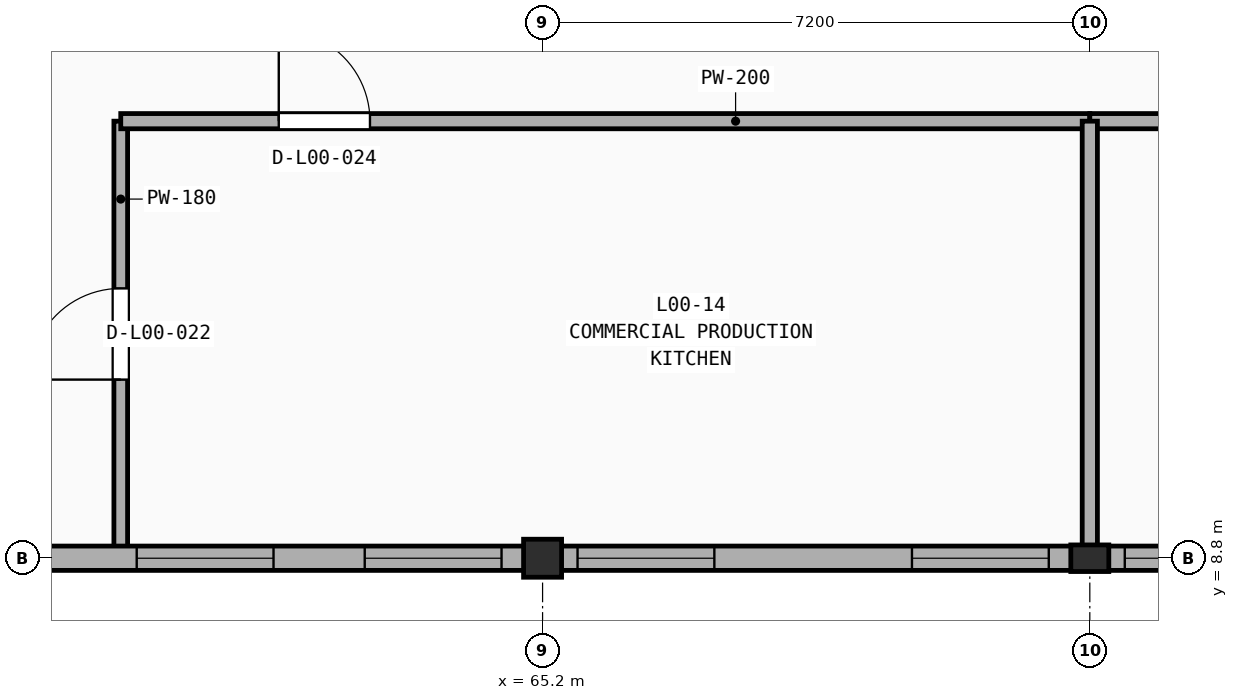
"""IFC4 building model, lengths in metres.
Left out: names, types, materials, properties, quantities, classifications, styles, units other than length and angle.
Written with IfcOpenShell. Run it as: python <this file> out.ifc"""

import sys

from ifc_helpers import new_model, si_unit, direction, frame, frame_2d, origin, origin_2d, place, context, subcontext, project, spatial, rectangle, extrude, element, fill, save


model = new_model("IFC4")
c1 = context("Model", 3, precision=1e-05, world=origin(), true_north=direction((0.0, 1.0)))
c2 = subcontext(c1, "Body", "Model", "MODEL_VIEW")
j1 = project(units=[si_unit("LENGTHUNIT", "METRE"), si_unit("PLANEANGLEUNIT", "RADIAN")], contexts=[c1])
p1 = place(None, origin())
s1 = spatial("IfcSite", under=j1, at=p1, CompositionType="ELEMENT")
p2 = place(p1, origin())
s2 = spatial("IfcBuilding", under=s1, at=p2, CompositionType="ELEMENT")
p3 = place(p2, origin())
s3 = spatial("IfcBuildingStorey", under=s2, at=p3, CompositionType="ELEMENT", Elevation=0.0)
p4 = place(p3, frame((65.2, 8.8, 0.0), z_axis=(0.0, 0.0, 1.0), x_axis=(1.0, 0.0, 0.0)))
e1 = element("IfcColumn", 1, at=p4, inside=s3, PredefinedType="COLUMN", context=c2, shape_type="SweptSolid", body=[
    extrude(rectangle(XDim=0.5, YDim=0.5, at=origin_2d()), origin(), (0.0, 0.0, 1.0), 5.4),
])
p5 = place(p3, frame((72.4, 8.8, 0.0), z_axis=(0.0, 0.0, 1.0), x_axis=(1.0, 0.0, 0.0)))
e2 = element("IfcColumn", 2, at=p5, inside=s3, PredefinedType="PILASTER", context=c2, shape_type="SweptSolid", body=[
    extrude(rectangle(XDim=0.5, YDim=0.35, at=origin_2d()), origin(), (0.0, 0.0, 1.0), 5.4),
])
p6 = place(p3, frame((59.65, 8.95, 0.0), z_axis=(0.0, 0.0, 1.0), x_axis=(0.0, 1.0, 0.0)))
e3 = element("IfcWall", 3, at=p6, inside=s3, PredefinedType="PARTITIONING", context=c2, shape_type="SweptSolid", body=[
    extrude(rectangle(XDim=5.6, YDim=0.18, at=frame_2d((2.8, 0.0))), origin(), (0.0, 0.0, 1.0), 4.64),
])
p7 = place(p6, frame((2.2, 0.0, -0.01)))
e4 = element("IfcOpeningElement", 4, at=p7, cuts=e3, PredefinedType="OPENING", context=c2, shape_type="SweptSolid", body=[
    extrude(rectangle(XDim=1.2, YDim=2.21, at=frame_2d((0.6, 1.105))), frame((0.0, 0.1, 0.0), z_axis=(0.0, -1.0, 0.0), x_axis=(1.0, 0.0, 0.0)), (0.0, 0.0, 1.0), 0.2),
])
p8 = place(p3, frame((59.65, 14.55, 0.0), z_axis=(0.0, 0.0, 1.0), x_axis=(1.0, 0.0, 0.0)))
e5 = element("IfcWall", 5, at=p8, inside=s3, PredefinedType="PARTITIONING", context=c2, shape_type="SweptSolid", body=[
    extrude(rectangle(XDim=12.75, YDim=0.2, at=frame_2d((6.375, 0.0))), origin(), (0.0, 0.0, 1.0), 4.39),
])
p9 = place(p8, frame((2.079, 0.0, -0.01)))
e6 = element("IfcOpeningElement", 6, at=p9, cuts=e5, PredefinedType="OPENING", context=c2, shape_type="SweptSolid", body=[
    extrude(rectangle(XDim=1.2, YDim=2.21, at=frame_2d((0.6, 1.105))), frame((0.0, 0.11, 0.0), z_axis=(0.0, -1.0, 0.0), x_axis=(1.0, 0.0, 0.0)), (0.0, 0.0, 1.0), 0.22),
])
p10 = place(p3, frame((72.4, 14.55, 0.0), z_axis=(0.0, 0.0, 1.0), x_axis=(1.0, 0.0, 0.0)))
e7 = element("IfcWall", 7, at=p10, inside=s3, PredefinedType="PARTITIONING", context=c2, shape_type="SweptSolid", body=[
    extrude(rectangle(XDim=14.55, YDim=0.2, at=frame_2d((7.275, 0.0))), origin(), (0.0, 0.0, 1.0), 4.39),
])
p11 = place(p10, frame((5.34, 0.0, -0.01)))
e8 = element("IfcOpeningElement", 8, at=p11, cuts=e7, PredefinedType="OPENING", context=c2, shape_type="SweptSolid", body=[
    extrude(rectangle(XDim=1.2, YDim=2.21, at=frame_2d((0.6, 1.105))), frame((0.0, 0.11, 0.0), z_axis=(0.0, -1.0, 0.0), x_axis=(1.0, 0.0, 0.0)), (0.0, 0.0, 1.0), 0.22),
])
p12 = place(p3, frame((72.4, 8.95, 0.0), z_axis=(0.0, 0.0, 1.0), x_axis=(0.0, 1.0, 0.0)))
e9 = element("IfcWall", 9, at=p12, inside=s3, PredefinedType="PARTITIONING", context=c2, shape_type="SweptSolid", body=[
    extrude(rectangle(XDim=5.6, YDim=0.2, at=frame_2d((2.8, 0.0))), origin(), (0.0, 0.0, 1.0), 4.39),
])
p13 = place(p3, frame((58.0, 8.8, 0.0), z_axis=(0.0, 0.0, 1.0), x_axis=(1.0, 0.0, 0.0)))
e10 = element("IfcWall", 10, at=p13, inside=s3, PredefinedType="SOLIDWALL", context=c2, shape_type="SweptSolid", body=[
    extrude(rectangle(XDim=7.2, YDim=0.32, at=frame_2d((3.6, 0.0))), origin(), (0.0, 0.0, 1.0), 4.39),
])
p14 = place(p13, frame((1.86, 0.0, 0.9)))
e11 = element("IfcOpeningElement", 11, at=p14, cuts=e10, PredefinedType="OPENING", context=c2, shape_type="SweptSolid", body=[
    extrude(rectangle(XDim=1.8, YDim=2.2, at=frame_2d((0.9, 1.1))), frame((0.0, 0.17, 0.0), z_axis=(0.0, -1.0, 0.0), x_axis=(1.0, 0.0, 0.0)), (0.0, 0.0, 1.0), 0.34),
])
p15 = place(p13, frame((4.86, 0.0, 0.9)))
e12 = element("IfcOpeningElement", 12, at=p15, cuts=e10, PredefinedType="OPENING", context=c2, shape_type="SweptSolid", body=[
    extrude(rectangle(XDim=1.8, YDim=2.2, at=frame_2d((0.9, 1.1))), frame((0.0, 0.17, 0.0), z_axis=(0.0, -1.0, 0.0), x_axis=(1.0, 0.0, 0.0)), (0.0, 0.0, 1.0), 0.34),
])
p16 = place(p3, frame((65.2, 8.8, 0.0), z_axis=(0.0, 0.0, 1.0), x_axis=(1.0, 0.0, 0.0)))
e13 = element("IfcWall", 13, at=p16, inside=s3, PredefinedType="SOLIDWALL", context=c2, shape_type="SweptSolid", body=[
    extrude(rectangle(XDim=7.2, YDim=0.32, at=frame_2d((3.6, 0.0))), origin(), (0.0, 0.0, 1.0), 4.39),
])
p17 = place(p16, frame((0.46, 0.0, 0.9)))
e14 = element("IfcOpeningElement", 14, at=p17, cuts=e13, PredefinedType="OPENING", context=c2, shape_type="SweptSolid", body=[
    extrude(rectangle(XDim=1.8, YDim=2.2, at=frame_2d((0.9, 1.1))), frame((0.0, 0.17, 0.0), z_axis=(0.0, -1.0, 0.0), x_axis=(1.0, 0.0, 0.0)), (0.0, 0.0, 1.0), 0.34),
])
p18 = place(p16, frame((4.86, 0.0, 0.9)))
e15 = element("IfcOpeningElement", 15, at=p18, cuts=e13, PredefinedType="OPENING", context=c2, shape_type="SweptSolid", body=[
    extrude(rectangle(XDim=1.8, YDim=2.2, at=frame_2d((0.9, 1.1))), frame((0.0, 0.17, 0.0), z_axis=(0.0, -1.0, 0.0), x_axis=(1.0, 0.0, 0.0)), (0.0, 0.0, 1.0), 0.34),
])
p19 = place(p3, frame((72.4, 8.8, 0.0), z_axis=(0.0, 0.0, 1.0), x_axis=(1.0, 0.0, 0.0)))
e16 = element("IfcWall", 16, at=p19, inside=s3, PredefinedType="SOLIDWALL", context=c2, shape_type="SweptSolid", body=[
    extrude(rectangle(XDim=7.2, YDim=0.32, at=frame_2d((3.6, 0.0))), origin(), (0.0, 0.0, 1.0), 4.39),
])
p20 = place(p19, frame((0.46, 0.0, 0.9)))
e17 = element("IfcOpeningElement", 17, at=p20, cuts=e16, PredefinedType="OPENING", context=c2, shape_type="SweptSolid", body=[
    extrude(rectangle(XDim=1.8, YDim=2.2, at=frame_2d((0.9, 1.1))), frame((0.0, 0.17, 0.0), z_axis=(0.0, -1.0, 0.0), x_axis=(1.0, 0.0, 0.0)), (0.0, 0.0, 1.0), 0.34),
])
p21 = place(p19, frame((4.86, 0.0, 0.9)))
e18 = element("IfcOpeningElement", 18, at=p21, cuts=e16, PredefinedType="OPENING", context=c2, shape_type="SweptSolid", body=[
    extrude(rectangle(XDim=1.8, YDim=2.2, at=frame_2d((0.9, 1.1))), frame((0.0, 0.17, 0.0), z_axis=(0.0, -1.0, 0.0), x_axis=(1.0, 0.0, 0.0)), (0.0, 0.0, 1.0), 0.34),
])
p22 = place(p7, frame((0.0, 0.0, 0.01)))
e19 = element("IfcDoor", 19, at=p22, inside=s3, OperationType="SINGLE_SWING_LEFT", PredefinedType="DOOR", context=c2, shape_type="SweptSolid", body=[
    extrude(rectangle(XDim=1.2, YDim=2.2, at=frame_2d((0.6, 1.1))), frame((0.0, 0.025, 0.0), z_axis=(0.0, -1.0, 0.0), x_axis=(1.0, 0.0, 0.0)), (0.0, 0.0, 1.0), 0.05),
])
fill(e4, e19)
p23 = place(p9, frame((1.2, 0.0, 0.01), z_axis=(0.0, 0.0, 1.0), x_axis=(-1.0, 0.0, 0.0)))
e20 = element("IfcDoor", 20, at=p23, inside=s3, OperationType="SINGLE_SWING_LEFT", PredefinedType="DOOR", context=c2, shape_type="SweptSolid", body=[
    extrude(rectangle(XDim=1.2, YDim=2.2, at=frame_2d((0.6, 1.1))), frame((0.0, 0.025, 0.0), z_axis=(0.0, -1.0, 0.0), x_axis=(1.0, 0.0, 0.0)), (0.0, 0.0, 1.0), 0.05),
])
fill(e6, e20)
p24 = place(p14, origin())
e21 = element("IfcWindow", 21, at=p24, inside=s3, PartitioningType="DOUBLE_PANEL_VERTICAL", PredefinedType="WINDOW", context=c2, shape_type="SweptSolid", body=[
    extrude(rectangle(XDim=1.8, YDim=2.2, at=frame_2d((0.9, 1.1))), frame((0.0, 0.03, 0.0), z_axis=(0.0, -1.0, 0.0), x_axis=(1.0, 0.0, 0.0)), (0.0, 0.0, 1.0), 0.06),
])
fill(e11, e21)
p25 = place(p15, origin())
e22 = element("IfcWindow", 22, at=p25, inside=s3, PartitioningType="DOUBLE_PANEL_VERTICAL", PredefinedType="WINDOW", context=c2, shape_type="SweptSolid", body=[
    extrude(rectangle(XDim=1.8, YDim=2.2, at=frame_2d((0.9, 1.1))), frame((0.0, 0.03, 0.0), z_axis=(0.0, -1.0, 0.0), x_axis=(1.0, 0.0, 0.0)), (0.0, 0.0, 1.0), 0.06),
])
fill(e12, e22)
p26 = place(p17, origin())
e23 = element("IfcWindow", 23, at=p26, inside=s3, PartitioningType="DOUBLE_PANEL_VERTICAL", PredefinedType="WINDOW", context=c2, shape_type="SweptSolid", body=[
    extrude(rectangle(XDim=1.8, YDim=2.2, at=frame_2d((0.9, 1.1))), frame((0.0, 0.03, 0.0), z_axis=(0.0, -1.0, 0.0), x_axis=(1.0, 0.0, 0.0)), (0.0, 0.0, 1.0), 0.06),
])
fill(e14, e23)
p27 = place(p18, origin())
e24 = element("IfcWindow", 24, at=p27, inside=s3, PartitioningType="DOUBLE_PANEL_VERTICAL", PredefinedType="WINDOW", context=c2, shape_type="SweptSolid", body=[
    extrude(rectangle(XDim=1.8, YDim=2.2, at=frame_2d((0.9, 1.1))), frame((0.0, 0.03, 0.0), z_axis=(0.0, -1.0, 0.0), x_axis=(1.0, 0.0, 0.0)), (0.0, 0.0, 1.0), 0.06),
])
fill(e15, e24)
p28 = place(p20, origin())
e25 = element("IfcWindow", 25, at=p28, inside=s3, PartitioningType="DOUBLE_PANEL_VERTICAL", PredefinedType="WINDOW", context=c2, shape_type="SweptSolid", body=[
    extrude(rectangle(XDim=1.8, YDim=2.2, at=frame_2d((0.9, 1.1))), frame((0.0, 0.03, 0.0), z_axis=(0.0, -1.0, 0.0), x_axis=(1.0, 0.0, 0.0)), (0.0, 0.0, 1.0), 0.06),
])
fill(e17, e25)
save(model, sys.argv[1])
